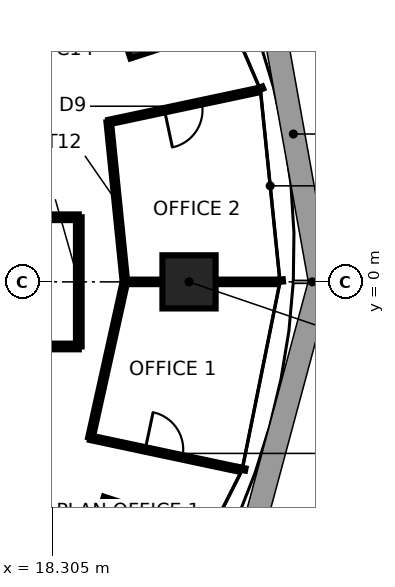
"""IFC4 building model, lengths in metres.
Left out: names, types, materials, properties, quantities, classifications, styles, units other than length and angle.
Written with IfcOpenShell. Run it as: python <this file> out.ifc"""

import sys

from ifc_helpers import new_model, si_unit, direction, frame, frame_2d, origin, origin_2d, place, context, subcontext, project, spatial, rectangle, extrude, element, fill, save


model = new_model("IFC4")
c1 = context("Model", 3, precision=1e-05, world=origin(), true_north=direction((0.0, 1.0)))
c2 = subcontext(c1, "Body", "Model", "MODEL_VIEW")
j1 = project(units=[si_unit("LENGTHUNIT", "METRE"), si_unit("PLANEANGLEUNIT", "RADIAN")], contexts=[c1])
p1 = place(None, origin())
s1 = spatial("IfcSite", under=j1, at=p1, CompositionType="ELEMENT")
p2 = place(p1, origin())
s2 = spatial("IfcBuilding", under=s1, at=p2, CompositionType="ELEMENT")
p3 = place(p2, frame((0.0, 0.0, 176.0)))
s3 = spatial("IfcBuildingStorey", under=s2, at=p3, CompositionType="ELEMENT", Elevation=176.0)
for number, where, z_axis, x_axis in (
    (1, (21.9, 0.0, 0.0), (0.0, 0.0, 1.0), (1.0, 0.0, 0.0)),
    (2, (20.808, 6.761, 0.0), (0.0, 0.0, 1.0), (0.951, 0.309, 0.0)),
    (3, (20.109, -6.534, 0.0), (0.0, 0.0, 1.0), (0.951, -0.309, 0.0)),
):
    element("IfcColumn", number, at=place(p3, frame(where, z_axis=z_axis, x_axis=x_axis)), inside=s3, PredefinedType="COLUMN", context=c2, shape_type="SweptSolid", body=[
        extrude(rectangle(XDim=1.4, YDim=1.4, at=origin_2d()), origin(), (0.0, 0.0, 1.0), 3.9),
    ])
p4 = place(p3, frame((19.306, -4.104, 0.0), z_axis=(0.0, 0.0, 1.0), x_axis=(0.978137903693, -0.207957306576, 0.0)))
e4 = element("IfcWall", 4, at=p4, inside=s3, PredefinedType="PARTITIONING", context=c2, shape_type="SweptSolid", body=[
    extrude(rectangle(XDim=4.0, YDim=0.12, at=frame_2d((2.0, 0.0))), origin(), (0.0, 0.0, 1.0), 3.74),
])
p5 = place(p4, frame((1.474, 0.0, 0.0)))
e5 = element("IfcOpeningElement", 5, at=p5, cuts=e4, PredefinedType="OPENING", context=c2, shape_type="SweptSolid", body=[
    extrude(rectangle(XDim=1.0, YDim=2.4, at=frame_2d((0.5, 1.2))), frame((0.0, 0.07, 0.0), z_axis=(0.0, -1.0, 0.0), x_axis=(1.0, 0.0, 0.0)), (0.0, 0.0, 1.0), 0.14),
])
p6 = place(p3, frame((20.214, 0.0, 0.0), z_axis=(0.0, 0.0, 1.0), x_axis=(-0.216149261834, -0.976360331337, 0.0)))
e6 = element("IfcWall", 6, at=p6, inside=s3, PredefinedType="PARTITIONING", context=c2, shape_type="SweptSolid", body=[
    extrude(rectangle(XDim=4.203, YDim=0.12, at=frame_2d((2.102, 0.0))), origin(), (0.0, 0.0, 1.0), 3.74),
])
p7 = place(p3, frame((16.0, -1.7, 0.0), z_axis=(0.0, 0.0, 1.0), x_axis=(1.0, 0.0, 0.0)))
e7 = element("IfcWall", 7, at=p7, inside=s3, PredefinedType="PARTITIONING", context=c2, shape_type="SweptSolid", body=[
    extrude(rectangle(XDim=3.0, YDim=0.15, at=frame_2d((1.5, 0.0))), origin(), (0.0, 0.0, 1.0), 3.74),
])
p8 = place(p3, frame((19.0, -1.7, 0.0), z_axis=(0.0, 0.0, 1.0), x_axis=(0.0, 1.0, 0.0)))
e8 = element("IfcWall", 8, at=p8, inside=s3, PredefinedType="PARTITIONING", context=c2, shape_type="SweptSolid", body=[
    extrude(rectangle(XDim=3.4, YDim=0.15, at=frame_2d((1.7, 0.0))), origin(), (0.0, 0.0, 1.0), 3.334),
])
p9 = place(p3, frame((20.214, 0.0, 0.0), z_axis=(0.0, 0.0, 1.0), x_axis=(1.0, 0.0, 0.0)))
e9 = element("IfcWall", 9, at=p9, inside=s3, PredefinedType="PARTITIONING", context=c2, shape_type="SweptSolid", body=[
    extrude(rectangle(XDim=4.0, YDim=0.12, at=frame_2d((2.0, 0.0))), origin(), (0.0, 0.0, 1.0), 3.04),
])
p10 = place(p3, frame((19.0, 1.7, 0.0), z_axis=(0.0, 0.0, 1.0), x_axis=(-1.0, 0.0, 0.0)))
e10 = element("IfcWall", 10, at=p10, inside=s3, PredefinedType="PARTITIONING", context=c2, shape_type="SweptSolid", body=[
    extrude(rectangle(XDim=3.0, YDim=0.15, at=frame_2d((1.5, 0.0))), origin(), (0.0, 0.0, 1.0), 3.74),
])
p11 = place(p3, frame((19.788, 4.206, 0.0), z_axis=(0.0, 0.0, 1.0), x_axis=(0.100830147459, -0.994903654312, 0.0)))
e11 = element("IfcWall", 11, at=p11, inside=s3, PredefinedType="PARTITIONING", context=c2, shape_type="SweptSolid", body=[
    extrude(rectangle(XDim=4.228, YDim=0.12, at=frame_2d((2.114, 0.0))), origin(), (0.0, 0.0, 1.0), 3.74),
])
p12 = place(p3, frame((23.7, 5.038, 0.0), z_axis=(0.0, 0.0, 1.0), x_axis=(-0.978152955943, -0.207886494942, 0.0)))
e12 = element("IfcWall", 12, at=p12, inside=s3, PredefinedType="PARTITIONING", context=c2, shape_type="SweptSolid", body=[
    extrude(rectangle(XDim=4.0, YDim=0.12, at=frame_2d((2.0, 0.0))), origin(), (0.0, 0.0, 1.0), 3.74),
])
p13 = place(p12, frame((1.5, 0.0, 0.0)))
e13 = element("IfcOpeningElement", 13, at=p13, cuts=e12, PredefinedType="OPENING", context=c2, shape_type="SweptSolid", body=[
    extrude(rectangle(XDim=1.0, YDim=2.4, at=frame_2d((0.5, 1.2))), frame((0.0, 0.07, 0.0), z_axis=(0.0, -1.0, 0.0), x_axis=(1.0, 0.0, 0.0)), (0.0, 0.0, 1.0), 0.14),
])
p14 = place(p5, origin())
e14 = element("IfcDoor", 14, at=p14, inside=s3, OperationType="SINGLE_SWING_LEFT", PredefinedType="DOOR", context=c2, shape_type="SweptSolid", body=[
    extrude(rectangle(XDim=1.0, YDim=2.4, at=frame_2d((0.5, 1.2))), frame((0.0, 0.025, 0.0), z_axis=(0.0, -1.0, 0.0), x_axis=(1.0, 0.0, 0.0)), (0.0, 0.0, 1.0), 0.05),
])
fill(e5, e14)
p15 = place(p13, origin())
e15 = element("IfcDoor", 15, at=p15, inside=s3, OperationType="SINGLE_SWING_RIGHT", PredefinedType="DOOR", context=c2, shape_type="SweptSolid", body=[
    extrude(rectangle(XDim=1.0, YDim=2.4, at=frame_2d((0.5, 1.2))), frame((0.0, 0.025, 0.0), z_axis=(0.0, -1.0, 0.0), x_axis=(1.0, 0.0, 0.0)), (0.0, 0.0, 1.0), 0.05),
])
fill(e13, e15)
save(model, sys.argv[1])
